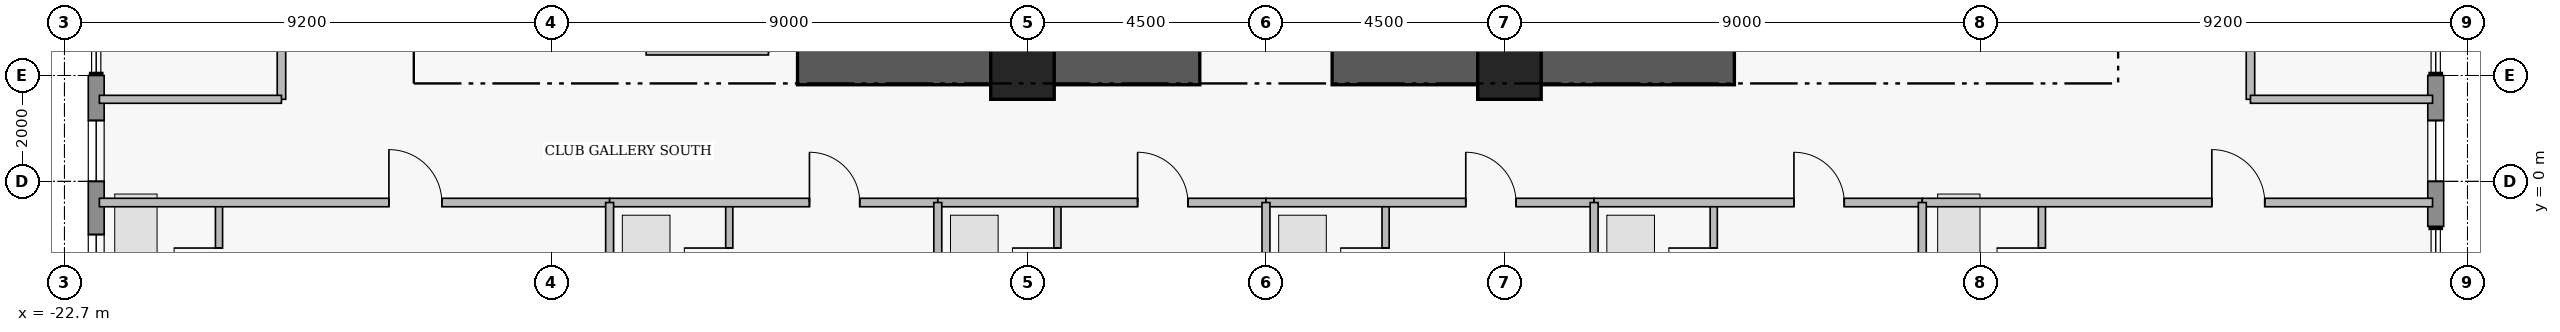
"""IFC4 building model, lengths in metres.
Left out: names, types, materials, properties, quantities, classifications, styles, units other than length and angle.
Written with IfcOpenShell. Run it as: python <this file> out.ifc"""

import sys

from ifc_helpers import new_model, si_unit, direction, frame, frame_2d, origin, origin_2d, place, context, subcontext, project, spatial, rectangle, extrude, element, fill, save


model = new_model("IFC4")
c1 = context("Model", 3, precision=1e-05, world=origin(), true_north=direction((0.0, 1.0)))
c2 = subcontext(c1, "Body", "Model", "MODEL_VIEW")
j1 = project(units=[si_unit("LENGTHUNIT", "METRE"), si_unit("PLANEANGLEUNIT", "RADIAN")], contexts=[c1])
p1 = place(None, origin())
s1 = spatial("IfcSite", under=j1, at=p1, CompositionType="ELEMENT")
p2 = place(p1, origin())
s2 = spatial("IfcBuilding", under=s1, at=p2, CompositionType="ELEMENT")
p3 = place(p2, frame((0.0, 0.0, 188.65)))
s3 = spatial("IfcBuildingStorey", under=s2, at=p3, CompositionType="ELEMENT", Elevation=188.65)
for number, where, z_axis, x_axis in (
    (1, (-8.85, 2.15, 0.0), (0.0, 0.0, 1.0), (1.0, 0.0, 0.0)),
    (2, (1.25, 2.15, 0.0), (0.0, 0.0, 1.0), (1.0, 0.0, 0.0)),
):
    element("IfcWall", number, at=place(p3, frame(where, z_axis=z_axis, x_axis=x_axis)), inside=s3, PredefinedType="SHEAR", context=c2, shape_type="SweptSolid", body=[
        extrude(rectangle(XDim=7.6, YDim=0.65, at=frame_2d((3.8, 0.0))), origin(), (0.0, 0.0, 1.0), 3.53),
    ])
for number, where, z_axis, x_axis in (
    (3, (-4.6, 2.15, 0.0), (0.0, 0.0, 1.0), (1.0, 0.0, 0.0)),
    (4, (4.6, 2.15, 0.0), (0.0, 0.0, 1.0), (1.0, 0.0, 0.0)),
):
    element("IfcColumn", number, at=place(p3, frame(where, z_axis=z_axis, x_axis=x_axis)), inside=s3, PredefinedType="COLUMN", context=c2, shape_type="SweptSolid", body=[
        extrude(rectangle(XDim=1.2, YDim=1.2, at=origin_2d()), origin(), (0.0, 0.0, 1.0), 3.75),
    ])
p4 = place(p3, frame((-22.1, -4.2, 0.0), z_axis=(0.0, 0.0, 1.0), x_axis=(0.0, 1.0, 0.0)))
e5 = element("IfcWall", 5, at=p4, inside=s3, PredefinedType="STANDARD", context=c2, shape_type="SweptSolid", body=[
    extrude(rectangle(XDim=6.2, YDim=0.3, at=frame_2d((3.1, 0.0))), origin(), (0.0, 0.0, 1.0), 3.53),
])
p5 = place(p4, frame((2.045, 0.0, 0.95)))
e6 = element("IfcOpeningElement", 6, at=p5, cuts=e5, PredefinedType="OPENING", context=c2, shape_type="SweptSolid", body=[
    extrude(rectangle(XDim=1.15, YDim=1.55, at=frame_2d((0.575, 0.775))), frame((0.0, 0.16, 0.0), z_axis=(0.0, -1.0, 0.0), x_axis=(1.0, 0.0, 0.0)), (0.0, 0.0, 1.0), 0.32),
])
p6 = place(p4, frame((4.2, 0.0, 0.95)))
e7 = element("IfcOpeningElement", 7, at=p6, cuts=e5, PredefinedType="OPENING", context=c2, shape_type="SweptSolid", body=[
    extrude(rectangle(XDim=1.15, YDim=1.55, at=frame_2d((0.575, 0.775))), frame((0.0, 0.16, 0.0), z_axis=(0.0, -1.0, 0.0), x_axis=(1.0, 0.0, 0.0)), (0.0, 0.0, 1.0), 0.32),
])
p7 = place(p3, frame((22.1, 2.0, 0.0), z_axis=(0.0, 0.0, 1.0), x_axis=(0.0, -1.0, 0.0)))
e8 = element("IfcWall", 8, at=p7, inside=s3, PredefinedType="STANDARD", context=c2, shape_type="SweptSolid", body=[
    extrude(rectangle(XDim=2.85, YDim=0.3, at=frame_2d((1.425, 0.0))), origin(), (0.0, 0.0, 1.0), 3.53),
])
p8 = place(p7, frame((0.85, 0.0, 0.95)))
e9 = element("IfcOpeningElement", 9, at=p8, cuts=e8, PredefinedType="OPENING", context=c2, shape_type="SweptSolid", body=[
    extrude(rectangle(XDim=1.15, YDim=1.55, at=frame_2d((0.575, 0.775))), frame((0.0, 0.16, 0.0), z_axis=(0.0, -1.0, 0.0), x_axis=(1.0, 0.0, 0.0)), (0.0, 0.0, 1.0), 0.32),
])
p9 = place(p3, frame((-19.78, -2.76, 0.0), z_axis=(0.0, 0.0, 1.0), x_axis=(0.0, 1.0, 0.0)))
e10 = element("IfcWall", 10, at=p9, inside=s3, PredefinedType="PLUMBINGWALL", context=c2, shape_type="SweptSolid", body=[
    extrude(rectangle(XDim=2.36, YDim=0.135, at=frame_2d((1.18, 0.0))), origin(), (0.0, 0.0, 1.0), 3.53),
])
p10 = place(p9, frame((0.65, 0.0, 0.0)))
e11 = element("IfcOpeningElement", 11, at=p10, cuts=e10, PredefinedType="OPENING", context=c2, shape_type="SweptSolid", body=[
    extrude(rectangle(XDim=0.85, YDim=2.1, at=frame_2d((0.425, 1.05))), frame((0.0, 0.077, 0.0), z_axis=(0.0, -1.0, 0.0), x_axis=(1.0, 0.0, 0.0)), (0.0, 0.0, 1.0), 0.155),
])
p11 = place(p3, frame((-22.04, -0.4, 0.0), z_axis=(0.0, 0.0, 1.0), x_axis=(1.0, 0.0, 0.0)))
e12 = element("IfcWall", 12, at=p11, inside=s3, PredefinedType="PARTITIONING", context=c2, shape_type="SweptSolid", body=[
    extrude(rectangle(XDim=9.64, YDim=0.16, at=frame_2d((4.82, 0.0))), origin(), (0.0, 0.0, 1.0), 3.53),
])
p12 = place(p11, frame((5.47, 0.0, 0.0)))
e13 = element("IfcOpeningElement", 13, at=p12, cuts=e12, PredefinedType="OPENING", context=c2, shape_type="SweptSolid", body=[
    extrude(rectangle(XDim=1.0, YDim=2.15, at=frame_2d((0.5, 1.075))), frame((0.0, 0.09, 0.0), z_axis=(0.0, -1.0, 0.0), x_axis=(1.0, 0.0, 0.0)), (0.0, 0.0, 1.0), 0.18),
])
p13 = place(p3, frame((-10.14, -2.76, 0.0), z_axis=(0.0, 0.0, 1.0), x_axis=(0.0, 1.0, 0.0)))
e14 = element("IfcWall", 14, at=p13, inside=s3, PredefinedType="PLUMBINGWALL", context=c2, shape_type="SweptSolid", body=[
    extrude(rectangle(XDim=2.36, YDim=0.135, at=frame_2d((1.18, 0.0))), origin(), (0.0, 0.0, 1.0), 3.53),
])
p14 = place(p13, frame((0.65, 0.0, 0.0)))
e15 = element("IfcOpeningElement", 15, at=p14, cuts=e14, PredefinedType="OPENING", context=c2, shape_type="SweptSolid", body=[
    extrude(rectangle(XDim=0.85, YDim=2.1, at=frame_2d((0.425, 1.05))), frame((0.0, 0.077, 0.0), z_axis=(0.0, -1.0, 0.0), x_axis=(1.0, 0.0, 0.0)), (0.0, 0.0, 1.0), 0.155),
])
p15 = place(p3, frame((-12.4, -0.4, 0.0), z_axis=(0.0, 0.0, 1.0), x_axis=(1.0, 0.0, 0.0)))
e16 = element("IfcWall", 16, at=p15, inside=s3, PredefinedType="PARTITIONING", context=c2, shape_type="SweptSolid", body=[
    extrude(rectangle(XDim=6.2, YDim=0.16, at=frame_2d((3.1, 0.0))), origin(), (0.0, 0.0, 1.0), 3.53),
])
p16 = place(p15, frame((3.775, 0.0, 0.0)))
e17 = element("IfcOpeningElement", 17, at=p16, cuts=e16, PredefinedType="OPENING", context=c2, shape_type="SweptSolid", body=[
    extrude(rectangle(XDim=0.95, YDim=2.15, at=frame_2d((0.475, 1.075))), frame((0.0, 0.09, 0.0), z_axis=(0.0, -1.0, 0.0), x_axis=(1.0, 0.0, 0.0)), (0.0, 0.0, 1.0), 0.18),
])
p17 = place(p3, frame((-3.94, -2.76, 0.0), z_axis=(0.0, 0.0, 1.0), x_axis=(0.0, 1.0, 0.0)))
e18 = element("IfcWall", 18, at=p17, inside=s3, PredefinedType="PLUMBINGWALL", context=c2, shape_type="SweptSolid", body=[
    extrude(rectangle(XDim=2.36, YDim=0.135, at=frame_2d((1.18, 0.0))), origin(), (0.0, 0.0, 1.0), 3.53),
])
p18 = place(p17, frame((0.65, 0.0, 0.0)))
e19 = element("IfcOpeningElement", 19, at=p18, cuts=e18, PredefinedType="OPENING", context=c2, shape_type="SweptSolid", body=[
    extrude(rectangle(XDim=0.85, YDim=2.1, at=frame_2d((0.425, 1.05))), frame((0.0, 0.077, 0.0), z_axis=(0.0, -1.0, 0.0), x_axis=(1.0, 0.0, 0.0)), (0.0, 0.0, 1.0), 0.155),
])
p19 = place(p3, frame((-6.2, -0.4, 0.0), z_axis=(0.0, 0.0, 1.0), x_axis=(1.0, 0.0, 0.0)))
e20 = element("IfcWall", 20, at=p19, inside=s3, PredefinedType="PARTITIONING", context=c2, shape_type="SweptSolid", body=[
    extrude(rectangle(XDim=6.2, YDim=0.16, at=frame_2d((3.1, 0.0))), origin(), (0.0, 0.0, 1.0), 3.53),
])
p20 = place(p19, frame((3.775, 0.0, 0.0)))
e21 = element("IfcOpeningElement", 21, at=p20, cuts=e20, PredefinedType="OPENING", context=c2, shape_type="SweptSolid", body=[
    extrude(rectangle(XDim=0.95, YDim=2.15, at=frame_2d((0.475, 1.075))), frame((0.0, 0.09, 0.0), z_axis=(0.0, -1.0, 0.0), x_axis=(1.0, 0.0, 0.0)), (0.0, 0.0, 1.0), 0.18),
])
p21 = place(p3, frame((2.26, -2.76, 0.0), z_axis=(0.0, 0.0, 1.0), x_axis=(0.0, 1.0, 0.0)))
e22 = element("IfcWall", 22, at=p21, inside=s3, PredefinedType="PLUMBINGWALL", context=c2, shape_type="SweptSolid", body=[
    extrude(rectangle(XDim=2.36, YDim=0.135, at=frame_2d((1.18, 0.0))), origin(), (0.0, 0.0, 1.0), 3.53),
])
p22 = place(p21, frame((0.65, 0.0, 0.0)))
e23 = element("IfcOpeningElement", 23, at=p22, cuts=e22, PredefinedType="OPENING", context=c2, shape_type="SweptSolid", body=[
    extrude(rectangle(XDim=0.85, YDim=2.1, at=frame_2d((0.425, 1.05))), frame((0.0, 0.077, 0.0), z_axis=(0.0, -1.0, 0.0), x_axis=(1.0, 0.0, 0.0)), (0.0, 0.0, 1.0), 0.155),
])
p23 = place(p3, frame((0.0, -0.4, 0.0), z_axis=(0.0, 0.0, 1.0), x_axis=(1.0, 0.0, 0.0)))
e24 = element("IfcWall", 24, at=p23, inside=s3, PredefinedType="PARTITIONING", context=c2, shape_type="SweptSolid", body=[
    extrude(rectangle(XDim=6.2, YDim=0.16, at=frame_2d((3.1, 0.0))), origin(), (0.0, 0.0, 1.0), 3.53),
])
p24 = place(p23, frame((3.775, 0.0, 0.0)))
e25 = element("IfcOpeningElement", 25, at=p24, cuts=e24, PredefinedType="OPENING", context=c2, shape_type="SweptSolid", body=[
    extrude(rectangle(XDim=0.95, YDim=2.15, at=frame_2d((0.475, 1.075))), frame((0.0, 0.09, 0.0), z_axis=(0.0, -1.0, 0.0), x_axis=(1.0, 0.0, 0.0)), (0.0, 0.0, 1.0), 0.18),
])
p25 = place(p3, frame((8.46, -2.76, 0.0), z_axis=(0.0, 0.0, 1.0), x_axis=(0.0, 1.0, 0.0)))
e26 = element("IfcWall", 26, at=p25, inside=s3, PredefinedType="PLUMBINGWALL", context=c2, shape_type="SweptSolid", body=[
    extrude(rectangle(XDim=2.36, YDim=0.135, at=frame_2d((1.18, 0.0))), origin(), (0.0, 0.0, 1.0), 3.53),
])
p26 = place(p25, frame((0.65, 0.0, 0.0)))
e27 = element("IfcOpeningElement", 27, at=p26, cuts=e26, PredefinedType="OPENING", context=c2, shape_type="SweptSolid", body=[
    extrude(rectangle(XDim=0.85, YDim=2.1, at=frame_2d((0.425, 1.05))), frame((0.0, 0.077, 0.0), z_axis=(0.0, -1.0, 0.0), x_axis=(1.0, 0.0, 0.0)), (0.0, 0.0, 1.0), 0.155),
])
p27 = place(p3, frame((6.2, -0.4, 0.0), z_axis=(0.0, 0.0, 1.0), x_axis=(1.0, 0.0, 0.0)))
e28 = element("IfcWall", 28, at=p27, inside=s3, PredefinedType="PARTITIONING", context=c2, shape_type="SweptSolid", body=[
    extrude(rectangle(XDim=6.2, YDim=0.16, at=frame_2d((3.1, 0.0))), origin(), (0.0, 0.0, 1.0), 3.53),
])
p28 = place(p27, frame((3.775, 0.0, 0.0)))
e29 = element("IfcOpeningElement", 29, at=p28, cuts=e28, PredefinedType="OPENING", context=c2, shape_type="SweptSolid", body=[
    extrude(rectangle(XDim=0.95, YDim=2.15, at=frame_2d((0.475, 1.075))), frame((0.0, 0.09, 0.0), z_axis=(0.0, -1.0, 0.0), x_axis=(1.0, 0.0, 0.0)), (0.0, 0.0, 1.0), 0.18),
])
p29 = place(p3, frame((14.66, -2.76, 0.0), z_axis=(0.0, 0.0, 1.0), x_axis=(0.0, 1.0, 0.0)))
e30 = element("IfcWall", 30, at=p29, inside=s3, PredefinedType="PLUMBINGWALL", context=c2, shape_type="SweptSolid", body=[
    extrude(rectangle(XDim=2.36, YDim=0.135, at=frame_2d((1.18, 0.0))), origin(), (0.0, 0.0, 1.0), 3.53),
])
p30 = place(p29, frame((0.65, 0.0, 0.0)))
e31 = element("IfcOpeningElement", 31, at=p30, cuts=e30, PredefinedType="OPENING", context=c2, shape_type="SweptSolid", body=[
    extrude(rectangle(XDim=0.85, YDim=2.1, at=frame_2d((0.425, 1.05))), frame((0.0, 0.077, 0.0), z_axis=(0.0, -1.0, 0.0), x_axis=(1.0, 0.0, 0.0)), (0.0, 0.0, 1.0), 0.155),
])
p31 = place(p3, frame((12.4, -0.4, 0.0), z_axis=(0.0, 0.0, 1.0), x_axis=(1.0, 0.0, 0.0)))
e32 = element("IfcWall", 32, at=p31, inside=s3, PredefinedType="PARTITIONING", context=c2, shape_type="SweptSolid", body=[
    extrude(rectangle(XDim=9.64, YDim=0.16, at=frame_2d((4.82, 0.0))), origin(), (0.0, 0.0, 1.0), 3.53),
])
p32 = place(p31, frame((5.47, 0.0, 0.0)))
e33 = element("IfcOpeningElement", 33, at=p32, cuts=e32, PredefinedType="OPENING", context=c2, shape_type="SweptSolid", body=[
    extrude(rectangle(XDim=1.0, YDim=2.15, at=frame_2d((0.5, 1.075))), frame((0.0, 0.09, 0.0), z_axis=(0.0, -1.0, 0.0), x_axis=(1.0, 0.0, 0.0)), (0.0, 0.0, 1.0), 0.18),
])
p33 = place(p3, frame((18.6, 1.55, 0.0), z_axis=(0.0, 0.0, 1.0), x_axis=(0.0, 1.0, 0.0)))
e34 = element("IfcWall", 34, at=p33, inside=s3, PredefinedType="PARTITIONING", context=c2, shape_type="SweptSolid", body=[
    extrude(rectangle(XDim=5.2, YDim=0.16, at=frame_2d((2.6, 0.0))), origin(), (0.0, 0.0, 1.0), 3.53),
])
p34 = place(p33, frame((2.14, 0.0, 0.0)))
e35 = element("IfcOpeningElement", 35, at=p34, cuts=e34, PredefinedType="OPENING", context=c2, shape_type="SweptSolid", body=[
    extrude(rectangle(XDim=0.92, YDim=2.12, at=frame_2d((0.46, 1.06))), frame((0.0, 0.09, 0.0), z_axis=(0.0, -1.0, 0.0), x_axis=(1.0, 0.0, 0.0)), (0.0, 0.0, 1.0), 0.18),
])
p35 = place(p3, frame((-18.6, 1.55, 0.0), z_axis=(0.0, 0.0, 1.0), x_axis=(0.0, 1.0, 0.0)))
e36 = element("IfcWall", 36, at=p35, inside=s3, PredefinedType="PARTITIONING", context=c2, shape_type="SweptSolid", body=[
    extrude(rectangle(XDim=5.2, YDim=0.16, at=frame_2d((2.6, 0.0))), origin(), (0.0, 0.0, 1.0), 3.53),
])
p36 = place(p35, frame((2.125, 0.0, 0.0)))
e37 = element("IfcOpeningElement", 37, at=p36, cuts=e36, PredefinedType="OPENING", context=c2, shape_type="SweptSolid", body=[
    extrude(rectangle(XDim=0.95, YDim=2.15, at=frame_2d((0.475, 1.075))), frame((0.0, 0.09, 0.0), z_axis=(0.0, -1.0, 0.0), x_axis=(1.0, 0.0, 0.0)), (0.0, 0.0, 1.0), 0.18),
])
p37 = place(p3, frame((-11.71, 2.47, 0.0), z_axis=(0.0, 0.0, 1.0), x_axis=(1.0, 0.0, 0.0)))
e38 = element("IfcWall", 38, at=p37, inside=s3, PredefinedType="PARTITIONING", context=c2, shape_type="SweptSolid", body=[
    extrude(rectangle(XDim=2.31, YDim=0.165, at=frame_2d((1.155, 0.0))), origin(), (0.0, 0.0, 1.0), 2.43),
])
for number, where, z_axis, x_axis in (
    (39, (-12.4, -7.52, 0.0), (0.0, 0.0, 1.0), (0.0, 1.0, 0.0)),
    (40, (-6.2, -7.52, 0.0), (0.0, 0.0, 1.0), (0.0, 1.0, 0.0)),
    (41, (0.0, -7.52, 0.0), (0.0, 0.0, 1.0), (0.0, 1.0, 0.0)),
    (42, (6.2, -7.52, 0.0), (0.0, 0.0, 1.0), (0.0, 1.0, 0.0)),
    (43, (12.4, -7.52, 0.0), (0.0, 0.0, 1.0), (0.0, 1.0, 0.0)),
):
    element("IfcWall", number, at=place(p3, frame(where, z_axis=z_axis, x_axis=x_axis)), inside=s3, PredefinedType="PARTITIONING", context=c2, shape_type="SweptSolid", body=[
        extrude(rectangle(XDim=7.12, YDim=0.15, at=frame_2d((3.56, 0.0))), origin(), (0.0, 0.0, 1.0), 3.53),
    ])
for number, where, z_axis, x_axis in (
    (44, (18.6, 1.55, 0.0), (0.0, 0.0, 1.0), (1.0, 0.0, 0.0)),
    (45, (-22.04, 1.55, 0.0), (0.0, 0.0, 1.0), (1.0, 0.0, 0.0)),
):
    element("IfcWall", number, at=place(p3, frame(where, z_axis=z_axis, x_axis=x_axis)), inside=s3, PredefinedType="PARTITIONING", context=c2, shape_type="SweptSolid", body=[
        extrude(rectangle(XDim=3.44, YDim=0.15, at=frame_2d((1.72, 0.0))), origin(), (0.0, 0.0, 1.0), 3.53),
    ])
p38 = place(p5, origin())
e46 = element("IfcWindow", 46, at=p38, inside=s3, PartitioningType="SINGLE_PANEL", PredefinedType="WINDOW", context=c2, shape_type="SweptSolid", body=[
    extrude(rectangle(XDim=1.15, YDim=1.55, at=frame_2d((0.575, 0.775))), frame((0.0, 0.03, 0.0), z_axis=(0.0, -1.0, 0.0), x_axis=(1.0, 0.0, 0.0)), (0.0, 0.0, 1.0), 0.06),
])
fill(e6, e46)
p39 = place(p6, origin())
e47 = element("IfcWindow", 47, at=p39, inside=s3, PartitioningType="SINGLE_PANEL", PredefinedType="WINDOW", context=c2, shape_type="SweptSolid", body=[
    extrude(rectangle(XDim=1.15, YDim=1.55, at=frame_2d((0.575, 0.775))), frame((0.0, 0.03, 0.0), z_axis=(0.0, -1.0, 0.0), x_axis=(1.0, 0.0, 0.0)), (0.0, 0.0, 1.0), 0.06),
])
fill(e7, e47)
p40 = place(p8, origin())
e48 = element("IfcWindow", 48, at=p40, inside=s3, PartitioningType="SINGLE_PANEL", PredefinedType="WINDOW", context=c2, shape_type="SweptSolid", body=[
    extrude(rectangle(XDim=1.15, YDim=1.55, at=frame_2d((0.575, 0.775))), frame((0.0, 0.03, 0.0), z_axis=(0.0, -1.0, 0.0), x_axis=(1.0, 0.0, 0.0)), (0.0, 0.0, 1.0), 0.06),
])
fill(e9, e48)
p41 = place(p10, origin())
e49 = element("IfcDoor", 49, at=p41, inside=s3, OperationType="SINGLE_SWING_RIGHT", PredefinedType="DOOR", context=c2, shape_type="SweptSolid", body=[
    extrude(rectangle(XDim=0.85, YDim=2.1, at=frame_2d((0.425, 1.05))), frame((0.0, 0.025, 0.0), z_axis=(0.0, -1.0, 0.0), x_axis=(1.0, 0.0, 0.0)), (0.0, 0.0, 1.0), 0.05),
])
fill(e11, e49)
p42 = place(p12, origin())
e50 = element("IfcDoor", 50, at=p42, inside=s3, OperationType="SINGLE_SWING_LEFT", PredefinedType="DOOR", context=c2, shape_type="SweptSolid", body=[
    extrude(rectangle(XDim=1.0, YDim=2.15, at=frame_2d((0.5, 1.075))), frame((0.0, 0.025, 0.0), z_axis=(0.0, -1.0, 0.0), x_axis=(1.0, 0.0, 0.0)), (0.0, 0.0, 1.0), 0.05),
])
fill(e13, e50)
p43 = place(p14, origin())
e51 = element("IfcDoor", 51, at=p43, inside=s3, OperationType="SINGLE_SWING_RIGHT", PredefinedType="DOOR", context=c2, shape_type="SweptSolid", body=[
    extrude(rectangle(XDim=0.85, YDim=2.1, at=frame_2d((0.425, 1.05))), frame((0.0, 0.025, 0.0), z_axis=(0.0, -1.0, 0.0), x_axis=(1.0, 0.0, 0.0)), (0.0, 0.0, 1.0), 0.05),
])
fill(e15, e51)
p44 = place(p16, origin())
e52 = element("IfcDoor", 52, at=p44, inside=s3, OperationType="SINGLE_SWING_LEFT", PredefinedType="DOOR", context=c2, shape_type="SweptSolid", body=[
    extrude(rectangle(XDim=0.95, YDim=2.15, at=frame_2d((0.475, 1.075))), frame((0.0, 0.025, 0.0), z_axis=(0.0, -1.0, 0.0), x_axis=(1.0, 0.0, 0.0)), (0.0, 0.0, 1.0), 0.05),
])
fill(e17, e52)
p45 = place(p18, origin())
e53 = element("IfcDoor", 53, at=p45, inside=s3, OperationType="SINGLE_SWING_RIGHT", PredefinedType="DOOR", context=c2, shape_type="SweptSolid", body=[
    extrude(rectangle(XDim=0.85, YDim=2.1, at=frame_2d((0.425, 1.05))), frame((0.0, 0.025, 0.0), z_axis=(0.0, -1.0, 0.0), x_axis=(1.0, 0.0, 0.0)), (0.0, 0.0, 1.0), 0.05),
])
fill(e19, e53)
p46 = place(p20, origin())
e54 = element("IfcDoor", 54, at=p46, inside=s3, OperationType="SINGLE_SWING_LEFT", PredefinedType="DOOR", context=c2, shape_type="SweptSolid", body=[
    extrude(rectangle(XDim=0.95, YDim=2.15, at=frame_2d((0.475, 1.075))), frame((0.0, 0.025, 0.0), z_axis=(0.0, -1.0, 0.0), x_axis=(1.0, 0.0, 0.0)), (0.0, 0.0, 1.0), 0.05),
])
fill(e21, e54)
p47 = place(p22, origin())
e55 = element("IfcDoor", 55, at=p47, inside=s3, OperationType="SINGLE_SWING_RIGHT", PredefinedType="DOOR", context=c2, shape_type="SweptSolid", body=[
    extrude(rectangle(XDim=0.85, YDim=2.1, at=frame_2d((0.425, 1.05))), frame((0.0, 0.025, 0.0), z_axis=(0.0, -1.0, 0.0), x_axis=(1.0, 0.0, 0.0)), (0.0, 0.0, 1.0), 0.05),
])
fill(e23, e55)
p48 = place(p24, origin())
e56 = element("IfcDoor", 56, at=p48, inside=s3, OperationType="SINGLE_SWING_LEFT", PredefinedType="DOOR", context=c2, shape_type="SweptSolid", body=[
    extrude(rectangle(XDim=0.95, YDim=2.15, at=frame_2d((0.475, 1.075))), frame((0.0, 0.025, 0.0), z_axis=(0.0, -1.0, 0.0), x_axis=(1.0, 0.0, 0.0)), (0.0, 0.0, 1.0), 0.05),
])
fill(e25, e56)
p49 = place(p26, origin())
e57 = element("IfcDoor", 57, at=p49, inside=s3, OperationType="SINGLE_SWING_RIGHT", PredefinedType="DOOR", context=c2, shape_type="SweptSolid", body=[
    extrude(rectangle(XDim=0.85, YDim=2.1, at=frame_2d((0.425, 1.05))), frame((0.0, 0.025, 0.0), z_axis=(0.0, -1.0, 0.0), x_axis=(1.0, 0.0, 0.0)), (0.0, 0.0, 1.0), 0.05),
])
fill(e27, e57)
p50 = place(p28, origin())
e58 = element("IfcDoor", 58, at=p50, inside=s3, OperationType="SINGLE_SWING_LEFT", PredefinedType="DOOR", context=c2, shape_type="SweptSolid", body=[
    extrude(rectangle(XDim=0.95, YDim=2.15, at=frame_2d((0.475, 1.075))), frame((0.0, 0.025, 0.0), z_axis=(0.0, -1.0, 0.0), x_axis=(1.0, 0.0, 0.0)), (0.0, 0.0, 1.0), 0.05),
])
fill(e29, e58)
p51 = place(p30, origin())
e59 = element("IfcDoor", 59, at=p51, inside=s3, OperationType="SINGLE_SWING_RIGHT", PredefinedType="DOOR", context=c2, shape_type="SweptSolid", body=[
    extrude(rectangle(XDim=0.85, YDim=2.1, at=frame_2d((0.425, 1.05))), frame((0.0, 0.025, 0.0), z_axis=(0.0, -1.0, 0.0), x_axis=(1.0, 0.0, 0.0)), (0.0, 0.0, 1.0), 0.05),
])
fill(e31, e59)
p52 = place(p32, origin())
e60 = element("IfcDoor", 60, at=p52, inside=s3, OperationType="SINGLE_SWING_LEFT", PredefinedType="DOOR", context=c2, shape_type="SweptSolid", body=[
    extrude(rectangle(XDim=1.0, YDim=2.15, at=frame_2d((0.5, 1.075))), frame((0.0, 0.025, 0.0), z_axis=(0.0, -1.0, 0.0), x_axis=(1.0, 0.0, 0.0)), (0.0, 0.0, 1.0), 0.05),
])
fill(e33, e60)
save(model, sys.argv[1])
